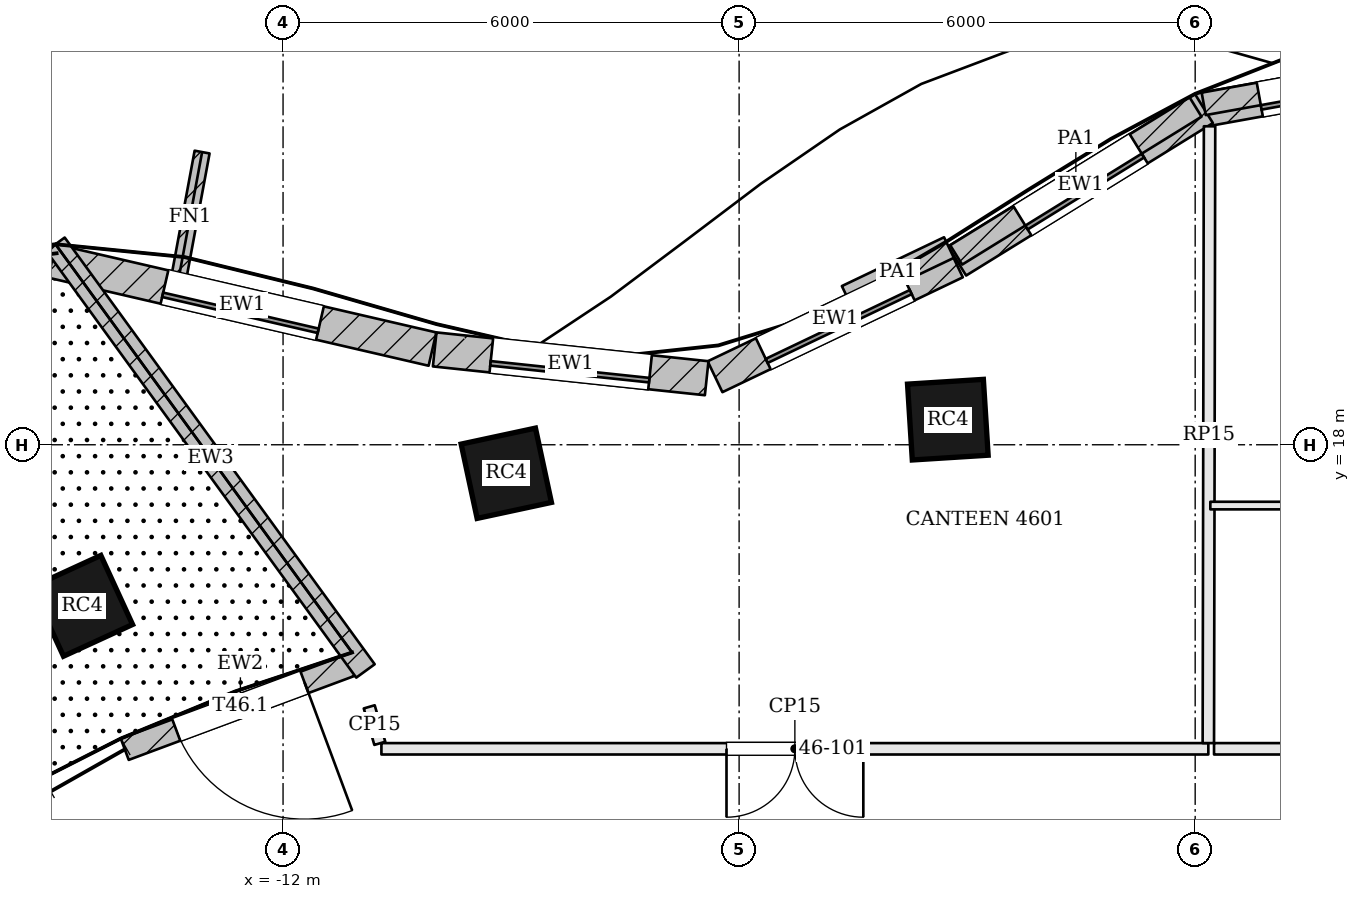
"""IFC4 building model, lengths in metres.
Left out: names, types, materials, properties, quantities, classifications, styles, units other than length and angle.
Written with IfcOpenShell. Run it as: python <this file> out.ifc"""

import sys

from ifc_helpers import new_model, si_unit, direction, frame, frame_2d, origin, origin_2d, place, context, subcontext, project, spatial, rectangle, extrude, element, fill, save


model = new_model("IFC4")
c1 = context("Model", 3, precision=1e-05, world=origin(), true_north=direction((0.0, 1.0)))
c2 = subcontext(c1, "Body", "Model", "MODEL_VIEW")
j1 = project(units=[si_unit("LENGTHUNIT", "METRE"), si_unit("PLANEANGLEUNIT", "RADIAN")], contexts=[c1])
p1 = place(None, origin())
s1 = spatial("IfcSite", under=j1, at=p1, CompositionType="ELEMENT")
p2 = place(p1, origin())
s2 = spatial("IfcBuilding", under=s1, at=p2, CompositionType="ELEMENT")
p3 = place(p2, frame((0.0, 0.0, 189.6)))
s3 = spatial("IfcBuildingStorey", under=s2, at=p3, CompositionType="ELEMENT", Elevation=189.6)
for number, where, z_axis, x_axis in (
    (1, (-3.254, 18.33, 0.0), (0.0, 0.0, 1.0), (-0.998, -0.063, 0.0)),
    (2, (-9.063, 17.625, 0.0), (0.0, 0.0, 1.0), (-0.978, -0.21, 0.0)),
    (3, (-14.643, 15.881, 0.0), (0.0, 0.0, 1.0), (-0.909, -0.417, 0.0)),
):
    element("IfcColumn", number, at=place(p3, frame(where, z_axis=z_axis, x_axis=x_axis)), inside=s3, PredefinedType="COLUMN", context=c2, shape_type="SweptSolid", body=[
        extrude(rectangle(XDim=1.0, YDim=1.0, at=origin_2d()), origin(), (0.0, 0.0, 1.0), 3.9),
    ])
p4 = place(p3, frame((3.727, 23.061, 0.0), z_axis=(0.0, 0.0, 1.0), x_axis=(-0.984119180424, -0.177508982087, 0.0)))
e4 = element("IfcWall", 4, at=p4, inside=s3, PredefinedType="SOLIDWALL", context=c2, shape_type="SweptSolid", body=[
    extrude(rectangle(XDim=3.747, YDim=0.45, at=frame_2d((1.873, 0.0))), origin(), (0.0, 0.0, 1.0), 3.7),
])
p5 = place(p4, frame((0.823, 0.0, 0.9)))
e5 = element("IfcOpeningElement", 5, at=p5, cuts=e4, PredefinedType="OPENING", context=c2, shape_type="SweptSolid", body=[
    extrude(rectangle(XDim=2.1, YDim=2.3, at=frame_2d((1.05, 1.15))), frame((0.0, 0.235, 0.0), z_axis=(0.0, -1.0, 0.0), x_axis=(1.0, 0.0, 0.0)), (0.0, 0.0, 1.0), 0.47),
])
p6 = place(p3, frame((0.115, 22.424, 0.0), z_axis=(0.0, 0.0, 1.0), x_axis=(-0.8506970368, -0.525656305564, 0.0)))
e6 = element("IfcWall", 6, at=p6, inside=s3, PredefinedType="SOLIDWALL", context=c2, shape_type="SweptSolid", body=[
    extrude(rectangle(XDim=3.816, YDim=0.45, at=frame_2d((1.908, 0.0))), origin(), (0.0, 0.0, 1.0), 3.7),
])
p7 = place(p6, frame((1.008, 0.0, 0.9)))
e7 = element("IfcOpeningElement", 7, at=p7, cuts=e6, PredefinedType="OPENING", context=c2, shape_type="SweptSolid", body=[
    extrude(rectangle(XDim=1.8, YDim=2.3, at=frame_2d((0.9, 1.15))), frame((0.0, 0.235, 0.0), z_axis=(0.0, -1.0, 0.0), x_axis=(1.0, 0.0, 0.0)), (0.0, 0.0, 1.0), 0.47),
])
p8 = place(p3, frame((-3.154, 20.406, 0.0), z_axis=(0.0, 0.0, 1.0), x_axis=(-0.902333313, -0.431038968367, 0.0)))
e8 = element("IfcWall", 8, at=p8, inside=s3, PredefinedType="SOLIDWALL", context=c2, shape_type="SweptSolid", body=[
    extrude(rectangle(XDim=3.505, YDim=0.45, at=frame_2d((1.753, 0.0))), origin(), (0.0, 0.0, 1.0), 3.7),
])
p9 = place(p8, frame((0.703, 0.0, 0.9)))
e9 = element("IfcOpeningElement", 9, at=p9, cuts=e8, PredefinedType="OPENING", context=c2, shape_type="SweptSolid", body=[
    extrude(rectangle(XDim=2.1, YDim=2.3, at=frame_2d((1.05, 1.15))), frame((0.0, 0.235, 0.0), z_axis=(0.0, -1.0, 0.0), x_axis=(1.0, 0.0, 0.0)), (0.0, 0.0, 1.0), 0.47),
])
p10 = place(p3, frame((-6.427, 18.875, 0.0), z_axis=(0.0, 0.0, 1.0), x_axis=(-0.994433468803, 0.10536638992, 0.0)))
e10 = element("IfcWall", 10, at=p10, inside=s3, PredefinedType="SOLIDWALL", context=c2, shape_type="SweptSolid", body=[
    extrude(rectangle(XDim=3.598, YDim=0.45, at=frame_2d((1.799, 0.0))), origin(), (0.0, 0.0, 1.0), 3.7),
])
p11 = place(p10, frame((0.749, 0.0, 0.9)))
e11 = element("IfcOpeningElement", 11, at=p11, cuts=e10, PredefinedType="OPENING", context=c2, shape_type="SweptSolid", body=[
    extrude(rectangle(XDim=2.1, YDim=2.3, at=frame_2d((1.05, 1.15))), frame((0.0, 0.235, 0.0), z_axis=(0.0, -1.0, 0.0), x_axis=(1.0, 0.0, 0.0)), (0.0, 0.0, 1.0), 0.47),
])
p12 = place(p3, frame((-10.034, 19.259, 0.0), z_axis=(0.0, 0.0, 1.0), x_axis=(-0.974223567844, 0.225584662283, 0.0)))
e12 = element("IfcWall", 12, at=p12, inside=s3, PredefinedType="SOLIDWALL", context=c2, shape_type="SweptSolid", body=[
    extrude(rectangle(XDim=5.139, YDim=0.45, at=frame_2d((2.569, 0.0))), origin(), (0.0, 0.0, 1.0), 3.7),
])
p13 = place(p12, frame((1.519, 0.0, 0.9)))
e13 = element("IfcOpeningElement", 13, at=p13, cuts=e12, PredefinedType="OPENING", context=c2, shape_type="SweptSolid", body=[
    extrude(rectangle(XDim=2.1, YDim=2.3, at=frame_2d((1.05, 1.15))), frame((0.0, 0.235, 0.0), z_axis=(0.0, -1.0, 0.0), x_axis=(1.0, 0.0, 0.0)), (0.0, 0.0, 1.0), 0.47),
])
p14 = place(p3, frame((-11.04, 15.126, 0.0), z_axis=(0.0, 0.0, 1.0), x_axis=(-0.937240711156, -0.348683021312, 0.0)))
e14 = element("IfcWall", 14, at=p14, inside=s3, PredefinedType="SOLIDWALL", context=c2, shape_type="SweptSolid", body=[
    extrude(rectangle(XDim=3.247, YDim=0.3, at=frame_2d((1.624, 0.0))), origin(), (0.0, 0.0, 1.0), 3.35),
])
p15 = place(p14, frame((0.723, 0.0, 0.0)))
e15 = element("IfcOpeningElement", 15, at=p15, cuts=e14, PredefinedType="OPENING", context=c2, shape_type="SweptSolid", body=[
    extrude(rectangle(XDim=1.8, YDim=2.4, at=frame_2d((0.9, 1.2))), frame((0.0, 0.16, 0.0), z_axis=(0.0, -1.0, 0.0), x_axis=(1.0, 0.0, 0.0)), (0.0, 0.0, 1.0), 0.32),
])
p16 = place(p3, frame((-13.384, 20.13, 0.0), z_axis=(0.0, 0.0, 1.0), x_axis=(0.182334037205, 0.983236644393, 0.0)))
e16 = element("IfcWall", 16, at=p16, inside=s3, PredefinedType="SOLIDWALL", context=c2, shape_type="SweptSolid", body=[
    extrude(rectangle(XDim=1.75, YDim=0.2, at=frame_2d((0.875, 0.0))), origin(), (0.0, 0.0, 1.0), 3.7),
])
p17 = place(p3, frame((-14.994, 20.638, 0.0), z_axis=(0.0, 0.0, 1.0), x_axis=(0.587753186398, -0.80904029064, 0.0)))
e17 = element("IfcWall", 17, at=p17, inside=s3, PredefinedType="SOLIDWALL", context=c2, shape_type="SweptSolid", body=[
    extrude(rectangle(XDim=6.938, YDim=0.3, at=frame_2d((3.469, 0.0))), origin(), (0.0, 0.0, 1.0), 3.254),
])
p18 = place(p3, frame((3.59, 23.112, 3.9), z_axis=(0.0, 0.0, 1.0), x_axis=(-0.984124248147, -0.177480884064, 0.0)))
e18 = element("IfcWall", 18, at=p18, inside=s3, PredefinedType="PARAPET", context=c2, shape_type="SweptSolid", body=[
    extrude(rectangle(XDim=3.534, YDim=0.3, at=frame_2d((1.767, 0.0))), origin(), (0.0, 0.0, 1.0), 1.1),
])
p19 = place(p3, frame((0.005, 22.444, 3.9), z_axis=(0.0, 0.0, 1.0), x_axis=(-0.850710394144, -0.525634688063, 0.0)))
e19 = element("IfcWall", 19, at=p19, inside=s3, PredefinedType="PARAPET", context=c2, shape_type="SweptSolid", body=[
    extrude(rectangle(XDim=3.702, YDim=0.3, at=frame_2d((1.851, 0.0))), origin(), (0.0, 0.0, 1.0), 1.1),
])
p20 = place(p3, frame((-3.239, 20.594, 3.9), z_axis=(0.0, 0.0, 1.0), x_axis=(-0.902344893923, -0.431014724123, 0.0)))
e20 = element("IfcWall", 20, at=p20, inside=s3, PredefinedType="PARAPET", context=c2, shape_type="SweptSolid", body=[
    extrude(rectangle(XDim=1.49, YDim=0.3, at=frame_2d((0.745, 0.0))), origin(), (0.0, 0.0, 1.0), 1.1),
])
p21 = place(p3, frame((0.173, 14.0, 0.0), z_axis=(0.0, 0.0, 1.0), x_axis=(-1.0, 0.0, 0.0)))
e21 = element("IfcWall", 21, at=p21, inside=s3, PredefinedType="PARTITIONING", context=c2, shape_type="SweptSolid", body=[
    extrude(rectangle(XDim=10.879, YDim=0.15, at=frame_2d((5.439, 0.0))), origin(), (0.0, 0.0, 1.0), 3.084),
])
p22 = place(p21, frame((4.539, 0.0, 0.0)))
e22 = element("IfcOpeningElement", 22, at=p22, cuts=e21, PredefinedType="OPENING", context=c2, shape_type="SweptSolid", body=[
    extrude(rectangle(XDim=1.8, YDim=2.1, at=frame_2d((0.9, 1.05))), frame((0.0, 0.085, 0.0), z_axis=(0.0, -1.0, 0.0), x_axis=(1.0, 0.0, 0.0)), (0.0, 0.0, 1.0), 0.17),
])
p23 = place(p3, frame((0.189, 22.19, 0.0), z_axis=(0.0, 0.0, 1.0), x_axis=(-0.001985675127, -0.999998028545, 0.0)))
e23 = element("IfcWall", 23, at=p23, inside=s3, PredefinedType="PARTITIONING", context=c2, shape_type="SweptSolid", body=[
    extrude(rectangle(XDim=8.115, YDim=0.15, at=frame_2d((4.057, 0.0))), origin(), (0.0, 0.0, 1.0), 3.184),
])
p24 = place(p3, frame((-10.866, 14.552, 0.0), z_axis=(0.0, 0.0, 1.0), x_axis=(0.278911917194, -0.960316688623, 0.0)))
e24 = element("IfcWall", 24, at=p24, inside=s3, PredefinedType="PARTITIONING", context=c2, shape_type="SweptSolid", body=[
    extrude(rectangle(XDim=0.5, YDim=0.15, at=frame_2d((0.25, 0.0))), origin(), (0.0, 0.0, 1.0), 3.084),
])
p25 = place(p3, frame((14.925, 14.0, 0.0), z_axis=(0.0, 0.0, 1.0), x_axis=(-1.0, 0.0, 0.0)))
e25 = element("IfcWall", 25, at=p25, inside=s3, PredefinedType="PARTITIONING", context=c2, shape_type="SweptSolid", body=[
    extrude(rectangle(XDim=14.677, YDim=0.15, at=frame_2d((7.338, 0.0))), origin(), (0.0, 0.0, 1.0), 3.084),
])
p26 = place(p25, frame((1.795, 0.0, 0.0)))
e26 = element("IfcOpeningElement", 26, at=p26, cuts=e25, PredefinedType="OPENING", context=c2, shape_type="SweptSolid", body=[
    extrude(rectangle(XDim=1.0, YDim=2.4, at=frame_2d((0.5, 1.2))), frame((0.0, 0.085, 0.0), z_axis=(0.0, -1.0, 0.0), x_axis=(1.0, 0.0, 0.0)), (0.0, 0.0, 1.0), 0.17),
])
p27 = place(p3, frame((0.199, 17.2, 0.0), z_axis=(0.0, 0.0, 1.0), x_axis=(1.0, 0.0, 0.0)))
e27 = element("IfcWall", 27, at=p27, inside=s3, PredefinedType="PARTITIONING", context=c2, shape_type="SweptSolid", body=[
    extrude(rectangle(XDim=8.322, YDim=0.1, at=frame_2d((4.161, 0.0))), origin(), (0.0, 0.0, 1.0), 3.084),
])
p28 = place(p27, frame((4.281, 0.0, 0.0)))
e28 = element("IfcOpeningElement", 28, at=p28, cuts=e27, PredefinedType="OPENING", context=c2, shape_type="SweptSolid", body=[
    extrude(rectangle(XDim=0.9, YDim=2.1, at=frame_2d((0.45, 1.05))), frame((0.0, 0.06, 0.0), z_axis=(0.0, -1.0, 0.0), x_axis=(1.0, 0.0, 0.0)), (0.0, 0.0, 1.0), 0.12),
])
p29 = place(p5, origin())
e29 = element("IfcWindow", 29, at=p29, inside=s3, PartitioningType="SINGLE_PANEL", PredefinedType="WINDOW", context=c2, shape_type="SweptSolid", body=[
    extrude(rectangle(XDim=2.1, YDim=2.3, at=frame_2d((1.05, 1.15))), frame((0.0, 0.135, 0.0), z_axis=(0.0, -1.0, 0.0), x_axis=(1.0, 0.0, 0.0)), (0.0, 0.0, 1.0), 0.06),
])
fill(e5, e29)
p30 = place(p7, origin())
e30 = element("IfcWindow", 30, at=p30, inside=s3, PartitioningType="SINGLE_PANEL", PredefinedType="WINDOW", context=c2, shape_type="SweptSolid", body=[
    extrude(rectangle(XDim=1.8, YDim=2.3, at=frame_2d((0.9, 1.15))), frame((0.0, 0.135, 0.0), z_axis=(0.0, -1.0, 0.0), x_axis=(1.0, 0.0, 0.0)), (0.0, 0.0, 1.0), 0.06),
])
fill(e7, e30)
p31 = place(p9, origin())
e31 = element("IfcWindow", 31, at=p31, inside=s3, PartitioningType="SINGLE_PANEL", PredefinedType="WINDOW", context=c2, shape_type="SweptSolid", body=[
    extrude(rectangle(XDim=2.1, YDim=2.3, at=frame_2d((1.05, 1.15))), frame((0.0, 0.135, 0.0), z_axis=(0.0, -1.0, 0.0), x_axis=(1.0, 0.0, 0.0)), (0.0, 0.0, 1.0), 0.06),
])
fill(e9, e31)
p32 = place(p11, origin())
e32 = element("IfcWindow", 32, at=p32, inside=s3, PartitioningType="SINGLE_PANEL", PredefinedType="WINDOW", context=c2, shape_type="SweptSolid", body=[
    extrude(rectangle(XDim=2.1, YDim=2.3, at=frame_2d((1.05, 1.15))), frame((0.0, 0.135, 0.0), z_axis=(0.0, -1.0, 0.0), x_axis=(1.0, 0.0, 0.0)), (0.0, 0.0, 1.0), 0.06),
])
fill(e11, e32)
p33 = place(p13, origin())
e33 = element("IfcWindow", 33, at=p33, inside=s3, PartitioningType="SINGLE_PANEL", PredefinedType="WINDOW", context=c2, shape_type="SweptSolid", body=[
    extrude(rectangle(XDim=2.1, YDim=2.3, at=frame_2d((1.05, 1.15))), frame((0.0, 0.135, 0.0), z_axis=(0.0, -1.0, 0.0), x_axis=(1.0, 0.0, 0.0)), (0.0, 0.0, 1.0), 0.06),
])
fill(e13, e33)
p34 = place(p15, origin())
e34 = element("IfcDoor", 34, at=p34, inside=s3, OperationType="DOUBLE_DOOR_DOUBLE_SWING", PredefinedType="DOOR", context=c2, shape_type="SweptSolid", body=[
    extrude(rectangle(XDim=1.8, YDim=2.4, at=frame_2d((0.9, 1.2))), frame((0.0, 0.025, 0.0), z_axis=(0.0, -1.0, 0.0), x_axis=(1.0, 0.0, 0.0)), (0.0, 0.0, 1.0), 0.05),
])
fill(e15, e34)
p35 = place(p22, origin())
e35 = element("IfcDoor", 35, at=p35, inside=s3, OperationType="DOUBLE_DOOR_SINGLE_SWING", PredefinedType="DOOR", context=c2, shape_type="SweptSolid", body=[
    extrude(rectangle(XDim=1.8, YDim=2.1, at=frame_2d((0.9, 1.05))), frame((0.0, 0.025, 0.0), z_axis=(0.0, -1.0, 0.0), x_axis=(1.0, 0.0, 0.0)), (0.0, 0.0, 1.0), 0.05),
])
fill(e22, e35)
save(model, sys.argv[1])
